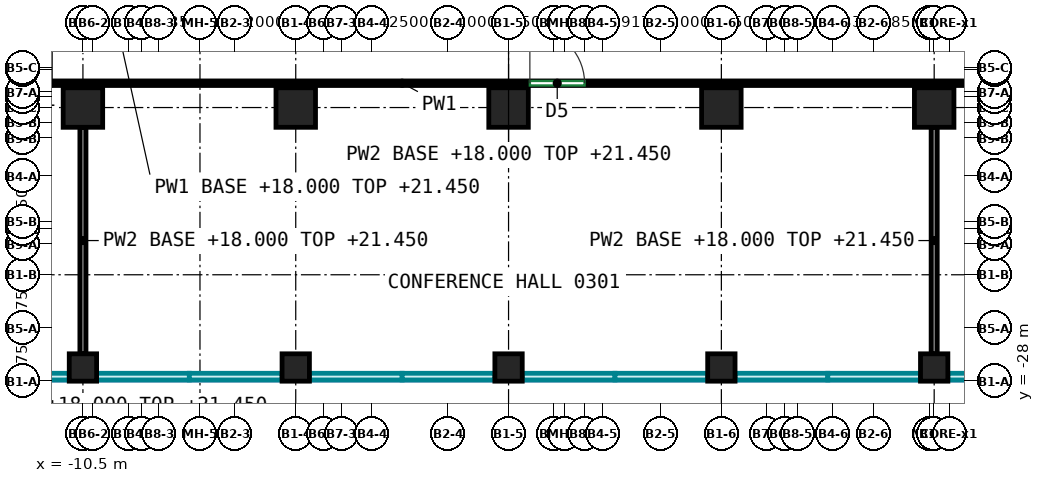
"""IFC4 building model, lengths in metres.
Left out: names, types, materials, properties, quantities, classifications, styles, units other than length and angle.
Written with IfcOpenShell. Run it as: python <this file> out.ifc"""

import sys

from ifc_helpers import new_model, si_unit, direction, frame, frame_2d, origin, origin_2d, place, context, subcontext, project, spatial, rectangle, extrude, source, transform, mapped, element, fill, save


model = new_model("IFC4")
c1 = context("Model", 3, precision=1e-05, world=origin(), true_north=direction((0.0, 1.0)))
c2 = subcontext(c1, "Body", "Model", "MODEL_VIEW")
j1 = project(units=[si_unit("LENGTHUNIT", "METRE"), si_unit("PLANEANGLEUNIT", "RADIAN")], contexts=[c1])
p1 = place(None, origin())
s1 = spatial("IfcSite", under=j1, at=p1, CompositionType="ELEMENT")
p2 = place(p1, origin())
s2 = spatial("IfcBuilding", under=s1, at=p2, CompositionType="ELEMENT")
p3 = place(p2, frame((0.0, 0.0, 18.0)))
s3 = spatial("IfcBuildingStorey", under=s2, at=p3, CompositionType="ELEMENT", Elevation=18.0)
m1 = source(origin(), c2, "Body", "SweptSolid", [
    extrude(rectangle(XDim=0.9, YDim=0.9, at=origin_2d()), origin(), (0.0, 0.0, 1.0), 4.1),
])
p4 = place(p3, frame((-10.5, -27.55, 0.0), z_axis=(0.0, 0.0, 1.0), x_axis=(1.0, 0.0, 0.0)))
e1 = element("IfcColumn", 1, at=p4, inside=s3, PredefinedType="COLUMN", context=c2, shape_type="MappedRepresentation", body=[
    mapped(m1, transform((0.0, 0.0, 0.0))),
])
m2 = source(origin(), c2, "Body", "SweptSolid", [
    extrude(rectangle(XDim=1.3, YDim=1.3, at=origin_2d()), origin(), (0.0, 0.0, 1.0), 4.1),
])
p5 = place(p3, frame((-10.5, -19.0, 0.0), z_axis=(0.0, 0.0, 1.0), x_axis=(1.0, 0.0, 0.0)))
e2 = element("IfcColumn", 2, at=p5, inside=s3, PredefinedType="COLUMN", context=c2, shape_type="MappedRepresentation", body=[
    mapped(m2, transform((0.0, 0.0, 0.0))),
])
p6 = place(p3, frame((-3.5, -27.55, 0.0), z_axis=(0.0, 0.0, 1.0), x_axis=(1.0, 0.0, 0.0)))
e3 = element("IfcColumn", 3, at=p6, inside=s3, PredefinedType="COLUMN", context=c2, shape_type="MappedRepresentation", body=[
    mapped(m1, transform((0.0, 0.0, 0.0))),
])
p7 = place(p3, frame((-3.5, -19.0, 0.0), z_axis=(0.0, 0.0, 1.0), x_axis=(1.0, 0.0, 0.0)))
e4 = element("IfcColumn", 4, at=p7, inside=s3, PredefinedType="COLUMN", context=c2, shape_type="MappedRepresentation", body=[
    mapped(m2, transform((0.0, 0.0, 0.0))),
])
p8 = place(p3, frame((3.5, -27.55, 0.0), z_axis=(0.0, 0.0, 1.0), x_axis=(1.0, 0.0, 0.0)))
e5 = element("IfcColumn", 5, at=p8, inside=s3, PredefinedType="COLUMN", context=c2, shape_type="MappedRepresentation", body=[
    mapped(m1, transform((0.0, 0.0, 0.0))),
])
p9 = place(p3, frame((3.5, -19.0, 0.0), z_axis=(0.0, 0.0, 1.0), x_axis=(1.0, 0.0, 0.0)))
e6 = element("IfcColumn", 6, at=p9, inside=s3, PredefinedType="COLUMN", context=c2, shape_type="MappedRepresentation", body=[
    mapped(m2, transform((0.0, 0.0, 0.0))),
])
p10 = place(p3, frame((10.5, -27.55, 0.0), z_axis=(0.0, 0.0, 1.0), x_axis=(1.0, 0.0, 0.0)))
e7 = element("IfcColumn", 7, at=p10, inside=s3, PredefinedType="COLUMN", context=c2, shape_type="MappedRepresentation", body=[
    mapped(m1, transform((0.0, 0.0, 0.0))),
])
p11 = place(p3, frame((10.5, -19.0, 0.0), z_axis=(0.0, 0.0, 1.0), x_axis=(1.0, 0.0, 0.0)))
e8 = element("IfcColumn", 8, at=p11, inside=s3, PredefinedType="COLUMN", context=c2, shape_type="MappedRepresentation", body=[
    mapped(m2, transform((0.0, 0.0, 0.0))),
])
p12 = place(p3, frame((17.5, -27.55, 0.0), z_axis=(0.0, 0.0, 1.0), x_axis=(1.0, 0.0, 0.0)))
e9 = element("IfcColumn", 9, at=p12, inside=s3, PredefinedType="COLUMN", context=c2, shape_type="MappedRepresentation", body=[
    mapped(m1, transform((0.0, 0.0, 0.0))),
])
p13 = place(p3, frame((17.5, -19.0, 0.0), z_axis=(0.0, 0.0, 1.0), x_axis=(1.0, 0.0, 0.0)))
e10 = element("IfcColumn", 10, at=p13, inside=s3, PredefinedType="COLUMN", context=c2, shape_type="MappedRepresentation", body=[
    mapped(m2, transform((0.0, 0.0, 0.0))),
])
p14 = place(p3, frame((-24.325, -18.2, 0.0), z_axis=(0.0, 0.0, 1.0), x_axis=(1.0, 0.0, 0.0)))
e11 = element("IfcWall", 11, at=p14, inside=s3, PredefinedType="PARTITIONING", context=c2, shape_type="SweptSolid", body=[
    extrude(rectangle(XDim=48.65, YDim=0.15, at=frame_2d((24.325, 0.0))), origin(), (0.0, 0.0, 1.0), 4.1),
])
p15 = place(p14, frame((7.818, 0.0, 0.0)))
e12 = element("IfcOpeningElement", 12, at=p15, cuts=e11, PredefinedType="OPENING", context=c2, shape_type="SweptSolid", body=[
    extrude(rectangle(XDim=0.9, YDim=2.1, at=frame_2d((0.45, 1.05))), frame((0.0, 0.085, 0.0), z_axis=(0.0, -1.0, 0.0), x_axis=(1.0, 0.0, 0.0)), (0.0, 0.0, 1.0), 0.17),
])
p16 = place(p14, frame((28.526, 0.0, 0.0)))
e13 = element("IfcOpeningElement", 13, at=p16, cuts=e11, PredefinedType="OPENING", context=c2, shape_type="SweptSolid", body=[
    extrude(rectangle(XDim=1.8, YDim=2.1, at=frame_2d((0.9, 1.05))), frame((0.0, 0.085, 0.0), z_axis=(0.0, -1.0, 0.0), x_axis=(1.0, 0.0, 0.0)), (0.0, 0.0, 1.0), 0.17),
])
p17 = place(p14, frame((44.531, 0.0, 0.0)))
e14 = element("IfcOpeningElement", 14, at=p17, cuts=e11, PredefinedType="OPENING", context=c2, shape_type="SweptSolid", body=[
    extrude(rectangle(XDim=0.9, YDim=2.1, at=frame_2d((0.45, 1.05))), frame((0.0, 0.085, 0.0), z_axis=(0.0, -1.0, 0.0), x_axis=(1.0, 0.0, 0.0)), (0.0, 0.0, 1.0), 0.17),
])
for number, where, z_axis, x_axis in (
    (15, (-10.5, -19.65, 0.0), (0.0, 0.0, 1.0), (0.0, -1.0, 0.0)),
    (16, (17.5, -27.1, 0.0), (0.0, 0.0, 1.0), (0.0, 1.0, 0.0)),
):
    element("IfcWall", number, at=place(p3, frame(where, z_axis=z_axis, x_axis=x_axis)), inside=s3, PredefinedType="PARTITIONING", context=c2, shape_type="SweptSolid", body=[
        extrude(rectangle(XDim=7.45, YDim=0.2, at=frame_2d((3.725, 0.0))), origin(), (0.0, 0.0, 1.0), 3.45),
    ])
p18 = place(p16, origin())
e17 = element("IfcDoor", 17, at=p18, inside=s3, OperationType="DOUBLE_DOOR_SINGLE_SWING", PredefinedType="DOOR", context=c2, shape_type="SweptSolid", body=[
    extrude(rectangle(XDim=1.8, YDim=2.1, at=frame_2d((0.9, 1.05))), frame((0.0, 0.025, 0.0), z_axis=(0.0, -1.0, 0.0), x_axis=(1.0, 0.0, 0.0)), (0.0, 0.0, 1.0), 0.05),
])
fill(e13, e17)
save(model, sys.argv[1])
